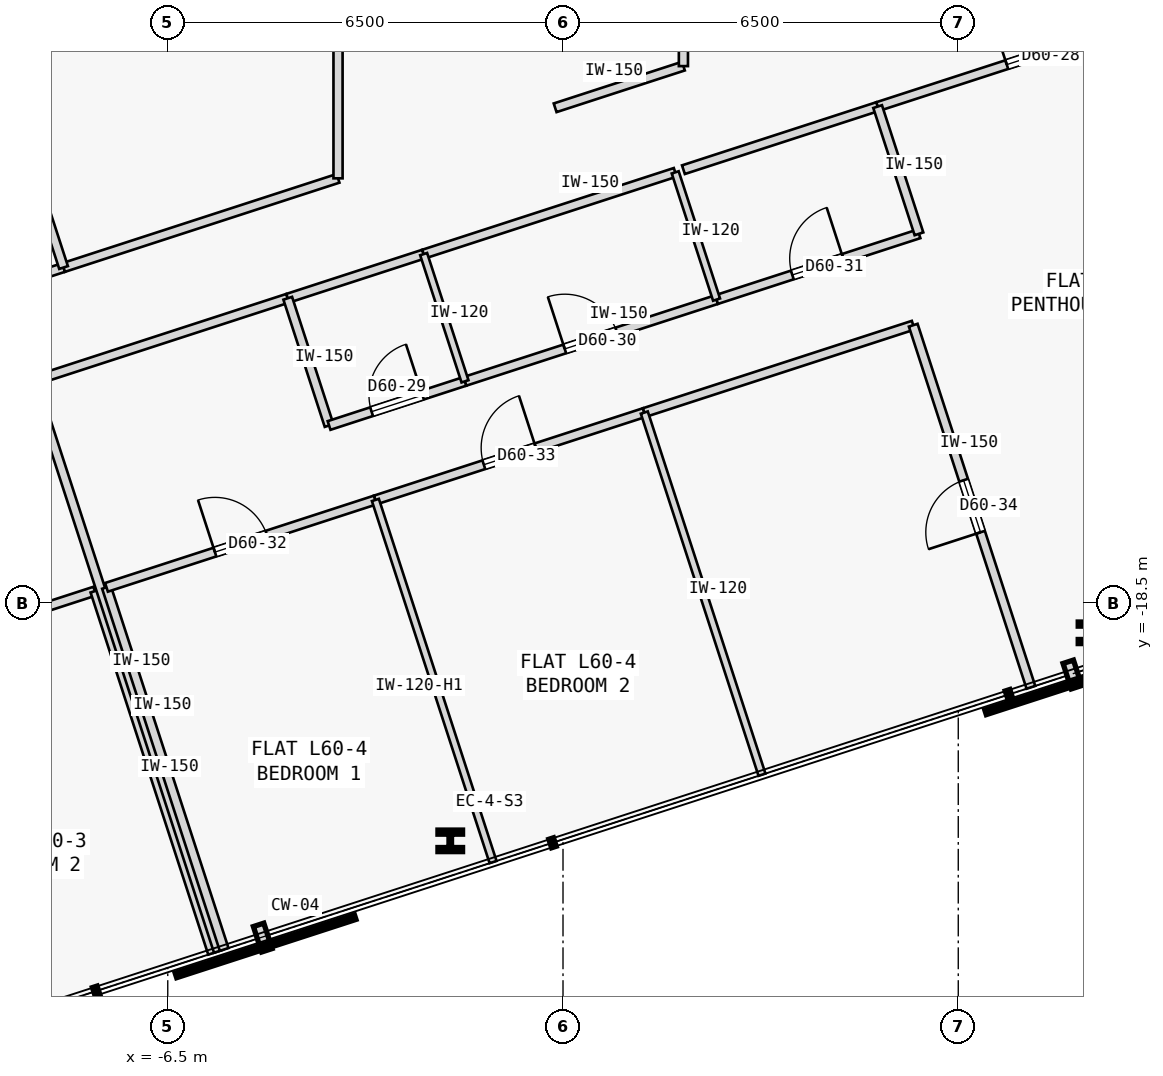
"""IFC4 building model, lengths in metres.
Left out: names, types, materials, properties, quantities, classifications, styles, units other than length and angle.
Written with IfcOpenShell. Run it as: python <this file> out.ifc"""

import sys

from ifc_helpers import new_model, si_unit, direction, frame, frame_2d, origin, origin_2d, place, context, subcontext, project, spatial, rectangle, i_section, extrude, element, fill, save


model = new_model("IFC4")
c1 = context("Model", 3, precision=1e-05, world=origin(), true_north=direction((0.0, 1.0)))
c2 = subcontext(c1, "Body", "Model", "MODEL_VIEW")
j1 = project(units=[si_unit("LENGTHUNIT", "METRE"), si_unit("PLANEANGLEUNIT", "RADIAN")], contexts=[c1])
p1 = place(None, origin())
s1 = spatial("IfcSite", under=j1, at=p1, CompositionType="ELEMENT")
p2 = place(p1, origin())
s2 = spatial("IfcBuilding", under=s1, at=p2, CompositionType="ELEMENT")
p3 = place(p2, frame((0.0, 0.0, 227.65)))
s3 = spatial("IfcBuildingStorey", under=s2, at=p3, CompositionType="ELEMENT", Elevation=227.65)
for number, where, z_axis, x_axis in (
    (1, (-1.854, -22.409, 0.0), (0.0, 0.0, 1.0), (1.0, 0.0, 0.0)),
    (2, (8.675, -18.988, 0.0), (0.0, 0.0, 1.0), (1.0, 0.0, 0.0)),
):
    element("IfcColumn", number, at=place(p3, frame(where, z_axis=z_axis, x_axis=x_axis)), inside=s3, PredefinedType="COLUMN", context=c2, shape_type="SweptSolid", body=[
        extrude(i_section(OverallWidth=0.405, OverallDepth=0.355, WebThickness=0.042, FlangeThickness=0.068, FilletRadius=0.015, at=origin_2d()), origin(), (0.0, 0.0, 1.0), 3.35),
    ])
p4 = place(p3, frame((-8.715, -14.847, 0.0), z_axis=(0.0, 0.0, 1.0), x_axis=(0.951061767293, 0.309000832997, 0.0)))
e3 = element("IfcWall", 3, at=p4, inside=s3, PredefinedType="PARTITIONING", context=c2, shape_type="SweptSolid", body=[
    extrude(rectangle(XDim=4.404, YDim=0.15, at=frame_2d((2.202, 0.0))), origin(), (0.0, 0.0, 1.0), 3.125),
])
p5 = place(p3, frame((5.174, -10.334, 0.0), z_axis=(0.0, 0.0, 1.0), x_axis=(0.951058579685, 0.30901064384, 0.0)))
e4 = element("IfcWall", 4, at=p5, inside=s3, PredefinedType="PARTITIONING", context=c2, shape_type="SweptSolid", body=[
    extrude(rectangle(XDim=5.416, YDim=0.15, at=frame_2d((2.708, 0.0))), origin(), (0.0, 0.0, 1.0), 3.125),
])
p6 = place(p5, frame((2.233, 0.0, 0.0)))
e5 = element("IfcOpeningElement", 5, at=p6, cuts=e4, PredefinedType="OPENING", context=c2, shape_type="SweptSolid", body=[
    extrude(rectangle(XDim=0.95, YDim=2.15, at=frame_2d((0.475, 1.075))), frame((0.0, 0.085, 0.0), z_axis=(0.0, -1.0, 0.0), x_axis=(1.0, 0.0, 0.0)), (0.0, 0.0, 1.0), 0.17),
])
p7 = place(p3, frame((-4.527, -13.486, 0.0), z_axis=(0.0, 0.0, 1.0), x_axis=(0.951045519245, 0.309050837767, 0.0)))
e6 = element("IfcWall", 6, at=p7, inside=s3, PredefinedType="PARTITIONING", context=c2, shape_type="SweptSolid", body=[
    extrude(rectangle(XDim=2.35, YDim=0.15, at=frame_2d((1.175, 0.0))), origin(), (0.0, 0.0, 1.0), 3.125),
])
p8 = place(p3, frame((-2.292, -12.76, 0.0), z_axis=(0.0, 0.0, 1.0), x_axis=(0.951052627573, 0.309028962374, 0.0)))
e7 = element("IfcWall", 7, at=p8, inside=s3, PredefinedType="PARTITIONING", context=c2, shape_type="SweptSolid", body=[
    extrude(rectangle(XDim=4.35, YDim=0.15, at=frame_2d((2.175, 0.0))), origin(), (0.0, 0.0, 1.0), 3.125),
])
p9 = place(p3, frame((1.98, -11.372, 0.0), z_axis=(0.0, 0.0, 1.0), x_axis=(0.951047958247, 0.309043332098, 0.0)))
e8 = element("IfcWall", 8, at=p9, inside=s3, PredefinedType="PARTITIONING", context=c2, shape_type="SweptSolid", body=[
    extrude(rectangle(XDim=3.358, YDim=0.15, at=frame_2d((1.679, 0.0))), origin(), (0.0, 0.0, 1.0), 3.125),
])
p10 = place(p3, frame((-0.129, -10.354, 0.0), z_axis=(0.0, 0.0, 1.0), x_axis=(0.951066420845, 0.308986509643, 0.0)))
e9 = element("IfcWall", 9, at=p10, inside=s3, PredefinedType="PARTITIONING", context=c2, shape_type="SweptSolid", body=[
    extrude(rectangle(XDim=2.218, YDim=0.15, at=frame_2d((1.109, 0.0))), origin(), (0.0, 0.0, 1.0), 3.125),
])
p11 = place(p3, frame((1.98, -9.668, 0.0), z_axis=(0.0, 0.0, 1.0), x_axis=(8.1241368e-05, 0.9999999967, 0.0)))
e10 = element("IfcWall", 10, at=p11, inside=s3, PredefinedType="PARTITIONING", context=c2, shape_type="SweptSolid", body=[
    extrude(rectangle(XDim=3.005, YDim=0.15, at=frame_2d((1.502, 0.0))), origin(), (0.0, 0.0, 1.0), 3.125),
])
p12 = place(p11, frame((1.042, 0.0, 0.0)))
e11 = element("IfcOpeningElement", 11, at=p12, cuts=e10, PredefinedType="OPENING", context=c2, shape_type="SweptSolid", body=[
    extrude(rectangle(XDim=0.92, YDim=2.15, at=frame_2d((0.46, 1.075))), frame((0.0, 0.085, 0.0), z_axis=(0.0, -1.0, 0.0), x_axis=(1.0, 0.0, 0.0)), (0.0, 0.0, 1.0), 0.17),
])
p13 = place(p3, frame((-11.73, -14.123, 0.0), z_axis=(0.0, 0.0, 1.0), x_axis=(0.951052502763, 0.309029346483, 0.0)))
e12 = element("IfcWall", 12, at=p13, inside=s3, PredefinedType="PARTITIONING", context=c2, shape_type="SweptSolid", body=[
    extrude(rectangle(XDim=3.698, YDim=0.15, at=frame_2d((1.849, 0.0))), origin(), (0.0, 0.0, 1.0), 3.125),
])
p14 = place(p13, frame((1.389, 0.0, 0.0)))
e13 = element("IfcOpeningElement", 13, at=p14, cuts=e12, PredefinedType="OPENING", context=c2, shape_type="SweptSolid", body=[
    extrude(rectangle(XDim=0.92, YDim=2.15, at=frame_2d((0.46, 1.075))), frame((0.0, 0.085, 0.0), z_axis=(0.0, -1.0, 0.0), x_axis=(1.0, 0.0, 0.0)), (0.0, 0.0, 1.0), 0.17),
])
p15 = place(p3, frame((-8.213, -12.98, 0.0), z_axis=(0.0, 0.0, 1.0), x_axis=(0.951058260096, 0.309011627456, 0.0)))
e14 = element("IfcWall", 14, at=p15, inside=s3, PredefinedType="PARTITIONING", context=c2, shape_type="SweptSolid", body=[
    extrude(rectangle(XDim=4.746, YDim=0.15, at=frame_2d((2.373, 0.0))), origin(), (0.0, 0.0, 1.0), 3.125),
])
p16 = place(p3, frame((-3.7, -11.514, 0.0), z_axis=(0.0, 0.0, 1.0), x_axis=(-8.2572974e-05, 0.999999996591, 0.0)))
e15 = element("IfcWall", 15, at=p16, inside=s3, PredefinedType="PARTITIONING", context=c2, shape_type="SweptSolid", body=[
    extrude(rectangle(XDim=5.913, YDim=0.15, at=frame_2d((2.957, 0.0))), origin(), (0.0, 0.0, 1.0), 3.125),
])
p17 = place(p16, frame((2.497, 0.0, 0.0)))
e16 = element("IfcOpeningElement", 16, at=p17, cuts=e15, PredefinedType="OPENING", context=c2, shape_type="SweptSolid", body=[
    extrude(rectangle(XDim=0.92, YDim=2.15, at=frame_2d((0.46, 1.075))), frame((0.0, 0.085, 0.0), z_axis=(0.0, -1.0, 0.0), x_axis=(1.0, 0.0, 0.0)), (0.0, 0.0, 1.0), 0.17),
])
p18 = place(p3, frame((-12.12, -19.738, 0.0), z_axis=(0.0, 0.0, 1.0), x_axis=(0.951065702951, 0.308988719326, 0.0)))
e17 = element("IfcWall", 17, at=p18, inside=s3, PredefinedType="PARTITIONING", context=c2, shape_type="SweptSolid", body=[
    extrude(rectangle(XDim=4.65, YDim=0.15, at=frame_2d((2.325, 0.0))), origin(), (0.0, 0.0, 1.0), 3.125),
])
p19 = place(p18, frame((1.875, 0.0, 0.0)))
e18 = element("IfcOpeningElement", 18, at=p19, cuts=e17, PredefinedType="OPENING", context=c2, shape_type="SweptSolid", body=[
    extrude(rectangle(XDim=0.9, YDim=2.15, at=frame_2d((0.45, 1.075))), frame((0.0, 0.085, 0.0), z_axis=(0.0, -1.0, 0.0), x_axis=(1.0, 0.0, 0.0)), (0.0, 0.0, 1.0), 0.17),
])
p20 = place(p3, frame((-5.763, -24.257, 0.0), z_axis=(0.0, 0.0, 1.0), x_axis=(-0.309060506107, 0.951042377376, 0.0)))
e19 = element("IfcWall", 19, at=p20, inside=s3, PredefinedType="PARTITIONING", context=c2, shape_type="SweptSolid", body=[
    extrude(rectangle(XDim=6.262, YDim=0.15, at=frame_2d((3.131, 0.0))), origin(), (0.0, 0.0, 1.0), 3.125),
])
p21 = place(p3, frame((-5.668, -24.226, 0.0), z_axis=(0.0, 0.0, 1.0), x_axis=(-0.309022258842, 0.95105480575, 0.0)))
e20 = element("IfcWall", 20, at=p21, inside=s3, PredefinedType="PARTITIONING", context=c2, shape_type="SweptSolid", body=[
    extrude(rectangle(XDim=9.862, YDim=0.15, at=frame_2d((4.931, 0.0))), origin(), (0.0, 0.0, 1.0), 3.125),
])
p22 = place(p3, frame((-3.847, -15.578, 0.0), z_axis=(0.0, 0.0, 1.0), x_axis=(-0.309060979314, 0.951042223598, 0.0)))
e21 = element("IfcWall", 21, at=p22, inside=s3, PredefinedType="PARTITIONING", context=c2, shape_type="SweptSolid", body=[
    extrude(rectangle(XDim=2.2, YDim=0.15, at=frame_2d((1.1, 0.0))), origin(), (0.0, 0.0, 1.0), 3.125),
])
p23 = place(p3, frame((-3.847, -15.578, 0.0), z_axis=(0.0, 0.0, 1.0), x_axis=(0.951035595692, 0.309081373955, 0.0)))
e22 = element("IfcWall", 22, at=p23, inside=s3, PredefinedType="PARTITIONING", context=c2, shape_type="SweptSolid", body=[
    extrude(rectangle(XDim=2.35, YDim=0.15, at=frame_2d((1.175, 0.0))), origin(), (0.0, 0.0, 1.0), 3.125),
])
p24 = place(p23, frame((0.735, 0.0, 0.0)))
e23 = element("IfcOpeningElement", 23, at=p24, cuts=e22, PredefinedType="OPENING", context=c2, shape_type="SweptSolid", body=[
    extrude(rectangle(XDim=0.88, YDim=2.15, at=frame_2d((0.44, 1.075))), frame((0.0, 0.085, 0.0), z_axis=(0.0, -1.0, 0.0), x_axis=(1.0, 0.0, 0.0)), (0.0, 0.0, 1.0), 0.17),
])
p25 = place(p3, frame((-1.612, -14.852, 0.0), z_axis=(0.0, 0.0, 1.0), x_axis=(0.951074479912, 0.30896170258, 0.0)))
e24 = element("IfcWall", 24, at=p25, inside=s3, PredefinedType="PARTITIONING", context=c2, shape_type="SweptSolid", body=[
    extrude(rectangle(XDim=4.35, YDim=0.15, at=frame_2d((2.175, 0.0))), origin(), (0.0, 0.0, 1.0), 3.125),
])
p26 = place(p25, frame((1.725, 0.0, 0.0)))
e25 = element("IfcOpeningElement", 25, at=p26, cuts=e24, PredefinedType="OPENING", context=c2, shape_type="SweptSolid", body=[
    extrude(rectangle(XDim=0.9, YDim=2.15, at=frame_2d((0.45, 1.075))), frame((0.0, 0.085, 0.0), z_axis=(0.0, -1.0, 0.0), x_axis=(1.0, 0.0, 0.0)), (0.0, 0.0, 1.0), 0.17),
])
p27 = place(p3, frame((2.525, -13.508, 0.0), z_axis=(0.0, 0.0, 1.0), x_axis=(0.95103509395, 0.3090829178, 0.0)))
e26 = element("IfcWall", 26, at=p27, inside=s3, PredefinedType="PARTITIONING", context=c2, shape_type="SweptSolid", body=[
    extrude(rectangle(XDim=3.5, YDim=0.15, at=frame_2d((1.75, 0.0))), origin(), (0.0, 0.0, 1.0), 3.125),
])
p28 = place(p27, frame((1.31, 0.0, 0.0)))
e27 = element("IfcOpeningElement", 27, at=p28, cuts=e26, PredefinedType="OPENING", context=c2, shape_type="SweptSolid", body=[
    extrude(rectangle(XDim=0.88, YDim=2.15, at=frame_2d((0.44, 1.075))), frame((0.0, 0.085, 0.0), z_axis=(0.0, -1.0, 0.0), x_axis=(1.0, 0.0, 0.0)), (0.0, 0.0, 1.0), 0.17),
])
p29 = place(p3, frame((5.854, -12.426, 0.0), z_axis=(0.0, 0.0, 1.0), x_axis=(-0.308960600764, 0.951074837842, 0.0)))
e28 = element("IfcWall", 28, at=p29, inside=s3, PredefinedType="PARTITIONING", context=c2, shape_type="SweptSolid", body=[
    extrude(rectangle(XDim=2.2, YDim=0.15, at=frame_2d((1.1, 0.0))), origin(), (0.0, 0.0, 1.0), 3.125),
])
p30 = place(p3, frame((-5.573, -24.195, 0.0), z_axis=(0.0, 0.0, 1.0), x_axis=(-0.309049046683, 0.951046101272, 0.0)))
e29 = element("IfcWall", 29, at=p30, inside=s3, PredefinedType="PARTITIONING", context=c2, shape_type="SweptSolid", body=[
    extrude(rectangle(XDim=6.262, YDim=0.15, at=frame_2d((3.131, 0.0))), origin(), (0.0, 0.0, 1.0), 3.125),
])
p31 = place(p3, frame((-7.508, -18.24, 0.0), z_axis=(0.0, 0.0, 1.0), x_axis=(0.951070715387, 0.308973290646, 0.0)))
e30 = element("IfcWall", 30, at=p31, inside=s3, PredefinedType="PARTITIONING", context=c2, shape_type="SweptSolid", body=[
    extrude(rectangle(XDim=4.65, YDim=0.15, at=frame_2d((2.325, 0.0))), origin(), (0.0, 0.0, 1.0), 3.125),
])
p32 = place(p31, frame((1.875, 0.0, 0.0)))
e31 = element("IfcOpeningElement", 31, at=p32, cuts=e30, PredefinedType="OPENING", context=c2, shape_type="SweptSolid", body=[
    extrude(rectangle(XDim=0.9, YDim=2.15, at=frame_2d((0.45, 1.075))), frame((0.0, 0.085, 0.0), z_axis=(0.0, -1.0, 0.0), x_axis=(1.0, 0.0, 0.0)), (0.0, 0.0, 1.0), 0.17),
])
p33 = place(p3, frame((-3.085, -16.803, 0.0), z_axis=(0.0, 0.0, 1.0), x_axis=(0.951050272606, 0.309036209813, 0.0)))
e32 = element("IfcWall", 32, at=p33, inside=s3, PredefinedType="PARTITIONING", context=c2, shape_type="SweptSolid", body=[
    extrude(rectangle(XDim=4.65, YDim=0.15, at=frame_2d((2.325, 0.0))), origin(), (0.0, 0.0, 1.0), 3.125),
])
p34 = place(p33, frame((1.875, 0.0, 0.0)))
e33 = element("IfcOpeningElement", 33, at=p34, cuts=e32, PredefinedType="OPENING", context=c2, shape_type="SweptSolid", body=[
    extrude(rectangle(XDim=0.9, YDim=2.15, at=frame_2d((0.45, 1.075))), frame((0.0, 0.085, 0.0), z_axis=(0.0, -1.0, 0.0), x_axis=(1.0, 0.0, 0.0)), (0.0, 0.0, 1.0), 0.17),
])
p35 = place(p3, frame((1.337, -15.366, 0.0), z_axis=(0.0, 0.0, 1.0), x_axis=(0.951050272606, 0.309036209813, 0.0)))
e34 = element("IfcWall", 34, at=p35, inside=s3, PredefinedType="PARTITIONING", context=c2, shape_type="SweptSolid", body=[
    extrude(rectangle(XDim=4.65, YDim=0.15, at=frame_2d((2.325, 0.0))), origin(), (0.0, 0.0, 1.0), 3.125),
])
p36 = place(p3, frame((7.695, -19.884, 0.0), z_axis=(0.0, 0.0, 1.0), x_axis=(-0.309013782848, 0.951057559777, 0.0)))
e35 = element("IfcWall", 35, at=p36, inside=s3, PredefinedType="PARTITIONING", context=c2, shape_type="SweptSolid", body=[
    extrude(rectangle(XDim=6.262, YDim=0.15, at=frame_2d((3.131, 0.0))), origin(), (0.0, 0.0, 1.0), 3.125),
])
p37 = place(p36, frame((2.681, 0.0, 0.0)))
e36 = element("IfcOpeningElement", 36, at=p37, cuts=e35, PredefinedType="OPENING", context=c2, shape_type="SweptSolid", body=[
    extrude(rectangle(XDim=0.9, YDim=2.15, at=frame_2d((0.45, 1.075))), frame((0.0, 0.085, 0.0), z_axis=(0.0, -1.0, 0.0), x_axis=(1.0, 0.0, 0.0)), (0.0, 0.0, 1.0), 0.17),
])
p38 = place(p3, frame((-1.612, -14.852, 0.0), z_axis=(0.0, 0.0, 1.0), x_axis=(-0.308960600764, 0.951074837842, 0.0)))
e37 = element("IfcWall", 37, at=p38, inside=s3, PredefinedType="PARTITIONING", context=c2, shape_type="SweptSolid", body=[
    extrude(rectangle(XDim=2.2, YDim=0.12, at=frame_2d((1.1, 0.0))), origin(), (0.0, 0.0, 1.0), 3.125),
])
p39 = place(p3, frame((2.525, -13.508, 0.0), z_axis=(0.0, 0.0, 1.0), x_axis=(-0.309028364152, 0.951052821956, 0.0)))
e38 = element("IfcWall", 38, at=p39, inside=s3, PredefinedType="PARTITIONING", context=c2, shape_type="SweptSolid", body=[
    extrude(rectangle(XDim=2.2, YDim=0.12, at=frame_2d((1.1, 0.0))), origin(), (0.0, 0.0, 1.0), 3.125),
])
p40 = place(p3, frame((-1.15, -22.758, 0.0), z_axis=(0.0, 0.0, 1.0), x_axis=(-0.309013782848, 0.951057559777, 0.0)))
e39 = element("IfcWall", 39, at=p40, inside=s3, PredefinedType="PARTITIONING", context=c2, shape_type="SweptSolid", body=[
    extrude(rectangle(XDim=6.262, YDim=0.12, at=frame_2d((3.131, 0.0))), origin(), (0.0, 0.0, 1.0), 2.675),
])
p41 = place(p3, frame((3.272, -21.321, 0.0), z_axis=(0.0, 0.0, 1.0), x_axis=(-0.309013782848, 0.951057559777, 0.0)))
e40 = element("IfcWall", 40, at=p41, inside=s3, PredefinedType="PARTITIONING", context=c2, shape_type="SweptSolid", body=[
    extrude(rectangle(XDim=6.262, YDim=0.12, at=frame_2d((3.131, 0.0))), origin(), (0.0, 0.0, 1.0), 3.125),
])
p42 = place(p3, frame((-8.213, -12.98, 0.0), z_axis=(0.0, 0.0, 1.0), x_axis=(-0.309017065592, 0.951056493155, 0.0)))
e41 = element("IfcWall", 41, at=p42, inside=s3, PredefinedType="PARTITIONING", context=c2, shape_type="SweptSolid", body=[
    extrude(rectangle(XDim=7.76, YDim=0.15, at=frame_2d((3.88, 0.0))), origin(), (0.0, 0.0, 1.0), 3.125),
])
p43 = place(p6, origin())
e42 = element("IfcDoor", 42, at=p43, inside=s3, OperationType="SINGLE_SWING_LEFT", PredefinedType="DOOR", context=c2, shape_type="SweptSolid", body=[
    extrude(rectangle(XDim=0.95, YDim=2.15, at=frame_2d((0.475, 1.075))), frame((0.0, 0.025, 0.0), z_axis=(0.0, -1.0, 0.0), x_axis=(1.0, 0.0, 0.0)), (0.0, 0.0, 1.0), 0.05),
])
fill(e5, e42)
p44 = place(p24, origin())
e43 = element("IfcDoor", 43, at=p44, inside=s3, OperationType="SINGLE_SWING_RIGHT", PredefinedType="DOOR", context=c2, shape_type="SweptSolid", body=[
    extrude(rectangle(XDim=0.88, YDim=2.15, at=frame_2d((0.44, 1.075))), frame((0.0, 0.025, 0.0), z_axis=(0.0, -1.0, 0.0), x_axis=(1.0, 0.0, 0.0)), (0.0, 0.0, 1.0), 0.05),
])
fill(e23, e43)
p45 = place(p26, origin())
e44 = element("IfcDoor", 44, at=p45, inside=s3, OperationType="SINGLE_SWING_LEFT", PredefinedType="DOOR", context=c2, shape_type="SweptSolid", body=[
    extrude(rectangle(XDim=0.9, YDim=2.15, at=frame_2d((0.45, 1.075))), frame((0.0, 0.025, 0.0), z_axis=(0.0, -1.0, 0.0), x_axis=(1.0, 0.0, 0.0)), (0.0, 0.0, 1.0), 0.05),
])
fill(e25, e44)
p46 = place(p28, origin())
e45 = element("IfcDoor", 45, at=p46, inside=s3, OperationType="SINGLE_SWING_RIGHT", PredefinedType="DOOR", context=c2, shape_type="SweptSolid", body=[
    extrude(rectangle(XDim=0.88, YDim=2.15, at=frame_2d((0.44, 1.075))), frame((0.0, 0.025, 0.0), z_axis=(0.0, -1.0, 0.0), x_axis=(1.0, 0.0, 0.0)), (0.0, 0.0, 1.0), 0.05),
])
fill(e27, e45)
p47 = place(p32, origin())
e46 = element("IfcDoor", 46, at=p47, inside=s3, OperationType="SINGLE_SWING_LEFT", PredefinedType="DOOR", context=c2, shape_type="SweptSolid", body=[
    extrude(rectangle(XDim=0.9, YDim=2.15, at=frame_2d((0.45, 1.075))), frame((0.0, 0.025, 0.0), z_axis=(0.0, -1.0, 0.0), x_axis=(1.0, 0.0, 0.0)), (0.0, 0.0, 1.0), 0.05),
])
fill(e31, e46)
p48 = place(p34, origin())
e47 = element("IfcDoor", 47, at=p48, inside=s3, OperationType="SINGLE_SWING_RIGHT", PredefinedType="DOOR", context=c2, shape_type="SweptSolid", body=[
    extrude(rectangle(XDim=0.9, YDim=2.15, at=frame_2d((0.45, 1.075))), frame((0.0, 0.025, 0.0), z_axis=(0.0, -1.0, 0.0), x_axis=(1.0, 0.0, 0.0)), (0.0, 0.0, 1.0), 0.05),
])
fill(e33, e47)
p49 = place(p37, origin())
e48 = element("IfcDoor", 48, at=p49, inside=s3, OperationType="SINGLE_SWING_LEFT", PredefinedType="DOOR", context=c2, shape_type="SweptSolid", body=[
    extrude(rectangle(XDim=0.9, YDim=2.15, at=frame_2d((0.45, 1.075))), frame((0.0, 0.025, 0.0), z_axis=(0.0, -1.0, 0.0), x_axis=(1.0, 0.0, 0.0)), (0.0, 0.0, 1.0), 0.05),
])
fill(e36, e48)
save(model, sys.argv[1])
